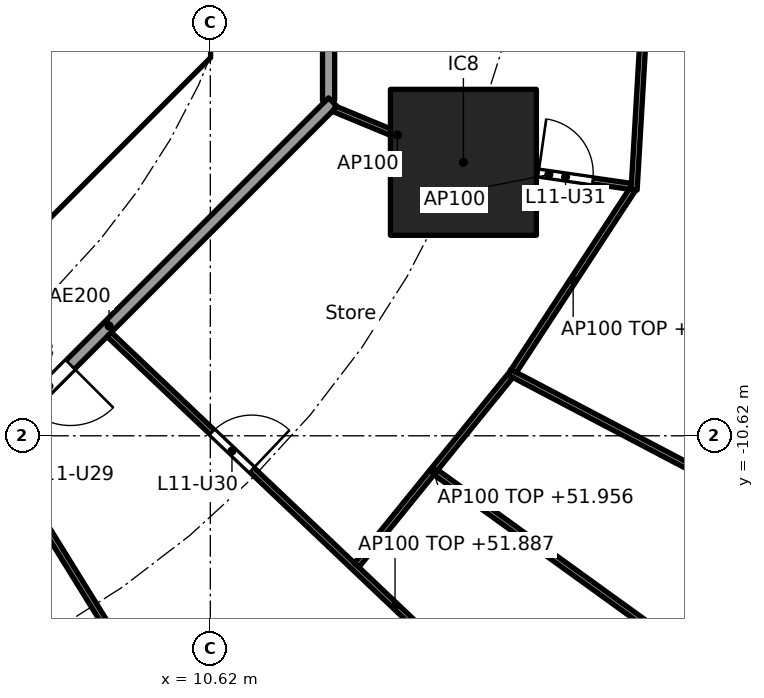
"""IFC4 building model, lengths in metres.
Left out: names, types, materials, properties, quantities, classifications, styles, units other than length and angle.
Written with IfcOpenShell. Run it as: python <this file> out.ifc"""

import sys

from ifc_helpers import new_model, si_unit, direction, frame, frame_2d, origin, origin_2d, place, context, subcontext, project, spatial, polyline, rectangle, outline, extrude, element, fill, save


model = new_model("IFC4")
c1 = context("Model", 3, precision=1e-05, world=origin(), true_north=direction((0.0, 1.0)))
c2 = subcontext(c1, "Body", "Model", "MODEL_VIEW")
j1 = project(units=[si_unit("LENGTHUNIT", "METRE"), si_unit("PLANEANGLEUNIT", "RADIAN")], contexts=[c1])
p1 = place(None, origin())
s1 = spatial("IfcSite", under=j1, at=p1, CompositionType="ELEMENT")
p2 = place(p1, origin())
s2 = spatial("IfcBuilding", under=s1, at=p2, CompositionType="ELEMENT")
p3 = place(p2, frame((0.0, 0.0, 49.2)))
s3 = spatial("IfcBuildingStorey", under=s2, at=p3, CompositionType="ELEMENT", Elevation=49.2)
p4 = place(p3, frame((14.782, -6.123, 0.0), z_axis=(0.0, 0.0, 1.0), x_axis=(1.0, 0.0, 0.0)))
e1 = element("IfcColumn", 1, at=p4, inside=s3, PredefinedType="COLUMN", context=c2, shape_type="SweptSolid", body=[
    extrude(rectangle(XDim=2.4, YDim=2.4, at=origin_2d()), origin(), (0.0, 0.0, 1.0), 3.7),
])
p5 = place(p3, frame((4.613, -9.988, 0.0), z_axis=(0.0, 0.0, 1.0), x_axis=(0.707106781187, 0.707106781187, 0.0)))
e2 = element("IfcWall", 2, at=p5, inside=s3, PredefinedType="SHEAR", context=c2, shape_type="SweptSolid", body=[
    extrude(rectangle(XDim=7.602, YDim=0.6, at=frame_2d((3.801, 0.0))), origin(), (0.0, 0.0, 1.0), 3.44),
])
p6 = place(p5, frame((3.201, 0.0, 0.0)))
e3 = element("IfcOpeningElement", 3, at=p6, cuts=e2, PredefinedType="OPENING", context=c2, shape_type="SweptSolid", body=[
    extrude(rectangle(XDim=1.2, YDim=2.1, at=frame_2d((0.6, 1.05))), frame((0.0, 0.31, 0.0), z_axis=(0.0, -1.0, 0.0), x_axis=(1.0, 0.0, 0.0)), (0.0, 0.0, 1.0), 0.62),
])
p7 = place(p3, origin())
e4 = element("IfcWall", 4, at=p7, inside=s3, PredefinedType="SHEAR", context=c2, shape_type="SweptSolid", body=[
    extrude(outline(polyline([(9.776, -4.401), (10.025, -4.152), (10.025, -3.801), (10.025, 4.152), (9.776, 4.401), (10.2, 4.825), (10.625, 4.401), (10.625, -4.401), (10.2, -4.825), (9.776, -4.401)])), origin(), (0.0, 0.0, 1.0), 3.44),
])
p8 = place(p3, frame((12.565, -5.104, 0.0), z_axis=(0.0, 0.0, 1.0), x_axis=(0.0, 1.0, 0.0)))
e5 = element("IfcWall", 5, at=p8, inside=s3, PredefinedType="PARTITIONING", context=c2, shape_type="SweptSolid", body=[
    extrude(rectangle(XDim=10.209, YDim=0.2, at=frame_2d((5.104, 0.0))), origin(), (0.0, 0.0, 1.0), 3.44),
])
p9 = place(p3, frame((5.275, -12.494, 0.0), z_axis=(0.0, 0.0, 1.0), x_axis=(0.707106781187, 0.707106781187, 0.0)))
e6 = element("IfcWall", 6, at=p9, inside=s3, PredefinedType="PARTITIONING", context=c2, shape_type="SweptSolid", body=[
    extrude(rectangle(XDim=10.409, YDim=0.2, at=frame_2d((5.205, 0.0))), origin(), (0.0, 0.0, 1.0), 3.44),
])
p10 = place(p9, frame((3.303, 0.0, 0.0)))
e7 = element("IfcOpeningElement", 7, at=p10, cuts=e6, PredefinedType="OPENING", context=c2, shape_type="SweptSolid", body=[
    extrude(rectangle(XDim=1.0, YDim=2.1, at=frame_2d((0.5, 1.05))), frame((0.0, 0.11, 0.0), z_axis=(0.0, -1.0, 0.0), x_axis=(1.0, 0.0, 0.0)), (0.0, 0.0, 1.0), 0.22),
])
p11 = place(p3, frame((17.971, -0.05, 0.0), z_axis=(0.0, 0.0, 1.0), x_axis=(-0.058476853647, -0.998288764631, 0.0)))
e8 = element("IfcWall", 8, at=p11, inside=s3, PredefinedType="PARTITIONING", context=c2, shape_type="SweptSolid", body=[
    extrude(rectangle(XDim=6.538, YDim=0.1, at=frame_2d((3.269, 0.0))), origin(), (0.0, 0.0, 1.0), 2.756),
])
p12 = place(p11, frame((2.794, 0.0, 0.0)))
e9 = element("IfcOpeningElement", 9, at=p12, cuts=e8, PredefinedType="OPENING", context=c2, shape_type="SweptSolid", body=[
    extrude(rectangle(XDim=0.9, YDim=2.1, at=frame_2d((0.45, 1.05))), frame((0.0, 0.06, 0.0), z_axis=(0.0, -1.0, 0.0), x_axis=(1.0, 0.0, 0.0)), (0.0, 0.0, 1.0), 0.12),
])
p13 = place(p3, frame((7.097, -10.81, 0.0), z_axis=(0.0, 0.0, 1.0), x_axis=(0.526453266471, -0.850204068576, 0.0)))
e10 = element("IfcWall", 10, at=p13, inside=s3, PredefinedType="PARTITIONING", context=c2, shape_type="SweptSolid", body=[
    extrude(rectangle(XDim=19.85, YDim=0.1, at=frame_2d((9.925, 0.0))), origin(), (0.0, 0.0, 1.0), 2.687),
])
p14 = place(p13, frame((0.35, 0.0, 0.0)))
e11 = element("IfcOpeningElement", 11, at=p14, cuts=e10, PredefinedType="OPENING", context=c2, shape_type="SweptSolid", body=[
    extrude(rectangle(XDim=0.9, YDim=2.1, at=frame_2d((0.45, 1.05))), frame((0.0, 0.06, 0.0), z_axis=(0.0, -1.0, 0.0), x_axis=(1.0, 0.0, 0.0)), (0.0, 0.0, 1.0), 0.12),
])
p15 = place(p13, frame((8.795, 0.0, 0.0)))
e12 = element("IfcOpeningElement", 12, at=p15, cuts=e10, PredefinedType="OPENING", context=c2, shape_type="SweptSolid", body=[
    extrude(rectangle(XDim=0.9, YDim=2.1, at=frame_2d((0.45, 1.05))), frame((0.0, 0.06, 0.0), z_axis=(0.0, -1.0, 0.0), x_axis=(1.0, 0.0, 0.0)), (0.0, 0.0, 1.0), 0.12),
])
p16 = place(p3, frame((8.957, -8.953, 0.0), z_axis=(0.0, 0.0, 1.0), x_axis=(0.725250022034, -0.688485588476, 0.0)))
e13 = element("IfcWall", 13, at=p16, inside=s3, PredefinedType="PARTITIONING", context=c2, shape_type="SweptSolid", body=[
    extrude(rectangle(XDim=12.963, YDim=0.1, at=frame_2d((6.481, 0.0))), origin(), (0.0, 0.0, 1.0), 2.687),
])
p17 = place(p16, frame((2.333, 0.0, 0.0)))
e14 = element("IfcOpeningElement", 14, at=p17, cuts=e13, PredefinedType="OPENING", context=c2, shape_type="SweptSolid", body=[
    extrude(rectangle(XDim=0.9, YDim=2.1, at=frame_2d((0.45, 1.05))), frame((0.0, 0.06, 0.0), z_axis=(0.0, -1.0, 0.0), x_axis=(1.0, 0.0, 0.0)), (0.0, 0.0, 1.0), 0.12),
])
p18 = place(p16, frame((8.79, 0.0, 0.0)))
e15 = element("IfcOpeningElement", 15, at=p18, cuts=e13, PredefinedType="OPENING", context=c2, shape_type="SweptSolid", body=[
    extrude(rectangle(XDim=0.9, YDim=2.1, at=frame_2d((0.45, 1.05))), frame((0.0, 0.06, 0.0), z_axis=(0.0, -1.0, 0.0), x_axis=(1.0, 0.0, 0.0)), (0.0, 0.0, 1.0), 0.12),
])
p19 = place(p3, frame((13.026, -12.747, 0.0), z_axis=(0.0, 0.0, 1.0), x_axis=(0.630126826288, 0.776492229705, 0.0)))
e16 = element("IfcWall", 16, at=p19, inside=s3, PredefinedType="PARTITIONING", context=c2, shape_type="SweptSolid", body=[
    extrude(rectangle(XDim=4.007, YDim=0.1, at=frame_2d((2.003, 0.0))), origin(), (0.0, 0.0, 1.0), 2.756),
])
p20 = place(p3, frame((18.351, -17.803, 0.0), z_axis=(0.0, 0.0, 1.0), x_axis=(0.584563700282, 0.811347817099, 0.0)))
e17 = element("IfcWall", 17, at=p20, inside=s3, PredefinedType="PARTITIONING", context=c2, shape_type="SweptSolid", body=[
    extrude(rectangle(XDim=5.984, YDim=0.1, at=frame_2d((2.992, 0.0))), origin(), (0.0, 0.0, 1.0), 2.756),
])
p21 = place(p20, frame((4.038, 0.0, 0.0)))
e18 = element("IfcOpeningElement", 18, at=p21, cuts=e17, PredefinedType="OPENING", context=c2, shape_type="SweptSolid", body=[
    extrude(rectangle(XDim=0.9, YDim=2.1, at=frame_2d((0.45, 1.05))), frame((0.0, 0.06, 0.0), z_axis=(0.0, -1.0, 0.0), x_axis=(1.0, 0.0, 0.0)), (0.0, 0.0, 1.0), 0.12),
])
p22 = place(p3, frame((14.329, -11.221, 0.0), z_axis=(0.0, 0.0, 1.0), x_axis=(0.810671130917, -0.58550176558, 0.0)))
e19 = element("IfcWall", 19, at=p22, inside=s3, PredefinedType="PARTITIONING", context=c2, shape_type="SweptSolid", body=[
    extrude(rectangle(XDim=15.106, YDim=0.1, at=frame_2d((7.553, 0.0))), origin(), (0.0, 0.0, 1.0), 2.837),
])
p23 = place(p22, frame((10.659, 0.0, 0.0)))
e20 = element("IfcOpeningElement", 20, at=p23, cuts=e19, PredefinedType="OPENING", context=c2, shape_type="SweptSolid", body=[
    extrude(rectangle(XDim=0.9, YDim=2.1, at=frame_2d((0.45, 1.05))), frame((0.0, 0.06, 0.0), z_axis=(0.0, -1.0, 0.0), x_axis=(1.0, 0.0, 0.0)), (0.0, 0.0, 1.0), 0.12),
])
p24 = place(p3, frame((15.538, -9.574, 0.0), z_axis=(0.0, 0.0, 1.0), x_axis=(0.88517945493, -0.465249752895, 0.0)))
e21 = element("IfcWall", 21, at=p24, inside=s3, PredefinedType="PARTITIONING", context=c2, shape_type="SweptSolid", body=[
    extrude(rectangle(XDim=7.213, YDim=0.1, at=frame_2d((3.606, 0.0))), origin(), (0.0, 0.0, 1.0), 3.44),
])
p25 = place(p3, frame((15.609, -9.556, 0.0), z_axis=(0.0, 0.0, 1.0), x_axis=(0.547641765292, 0.836712911881, 0.0)))
e22 = element("IfcWall", 22, at=p25, inside=s3, PredefinedType="PARTITIONING", context=c2, shape_type="SweptSolid", body=[
    extrude(rectangle(XDim=3.57, YDim=0.1, at=frame_2d((1.785, 0.0))), origin(), (0.0, 0.0, 1.0), 2.756),
])
p26 = place(p3, frame((12.657, -5.243, 0.0), z_axis=(0.0, 0.0, 1.0), x_axis=(0.923864733477, -0.382719158442, 0.0)))
e23 = element("IfcWall", 23, at=p26, inside=s3, PredefinedType="PARTITIONING", context=c2, shape_type="SweptSolid", body=[
    extrude(rectangle(XDim=2.25, YDim=0.1, at=frame_2d((1.125, 0.0))), origin(), (0.0, 0.0, 1.0), 3.44),
])
p27 = place(p3, frame((14.832, -6.13, 0.0), z_axis=(0.0, 0.0, 1.0), x_axis=(0.989840446863, -0.142182593007, 0.0)))
e24 = element("IfcWall", 24, at=p27, inside=s3, PredefinedType="PARTITIONING", context=c2, shape_type="SweptSolid", body=[
    extrude(rectangle(XDim=2.739, YDim=0.1, at=frame_2d((1.369, 0.0))), origin(), (0.0, 0.0, 1.0), 3.44),
])
p28 = place(p27, frame((1.197, 0.0, 0.0)))
e25 = element("IfcOpeningElement", 25, at=p28, cuts=e24, PredefinedType="OPENING", context=c2, shape_type="SweptSolid", body=[
    extrude(rectangle(XDim=0.9, YDim=2.1, at=frame_2d((0.45, 1.05))), frame((0.0, 0.06, 0.0), z_axis=(0.0, -1.0, 0.0), x_axis=(1.0, 0.0, 0.0)), (0.0, 0.0, 1.0), 0.12),
])
p29 = place(p10, frame((1.0, 0.0, 0.0), x_axis=(-1.0, 0.0, 0.0)))
e26 = element("IfcDoor", 26, at=p29, inside=s3, OperationType="SINGLE_SWING_LEFT", PredefinedType="DOOR", context=c2, shape_type="SweptSolid", body=[
    extrude(rectangle(XDim=1.0, YDim=2.1, at=frame_2d((0.5, 1.05))), frame((0.0, 0.025, 0.0), z_axis=(0.0, -1.0, 0.0), x_axis=(1.0, 0.0, 0.0)), (0.0, 0.0, 1.0), 0.05),
])
fill(e7, e26)
p30 = place(p17, origin())
e27 = element("IfcDoor", 27, at=p30, inside=s3, OperationType="SINGLE_SWING_RIGHT", PredefinedType="DOOR", context=c2, shape_type="SweptSolid", body=[
    extrude(rectangle(XDim=0.9, YDim=2.1, at=frame_2d((0.45, 1.05))), frame((0.0, 0.025, 0.0), z_axis=(0.0, -1.0, 0.0), x_axis=(1.0, 0.0, 0.0)), (0.0, 0.0, 1.0), 0.05),
])
fill(e14, e27)
p31 = place(p28, origin())
e28 = element("IfcDoor", 28, at=p31, inside=s3, OperationType="SINGLE_SWING_LEFT", PredefinedType="DOOR", context=c2, shape_type="SweptSolid", body=[
    extrude(rectangle(XDim=0.9, YDim=2.1, at=frame_2d((0.45, 1.05))), frame((0.0, 0.025, 0.0), z_axis=(0.0, -1.0, 0.0), x_axis=(1.0, 0.0, 0.0)), (0.0, 0.0, 1.0), 0.05),
])
fill(e25, e28)
save(model, sys.argv[1])
